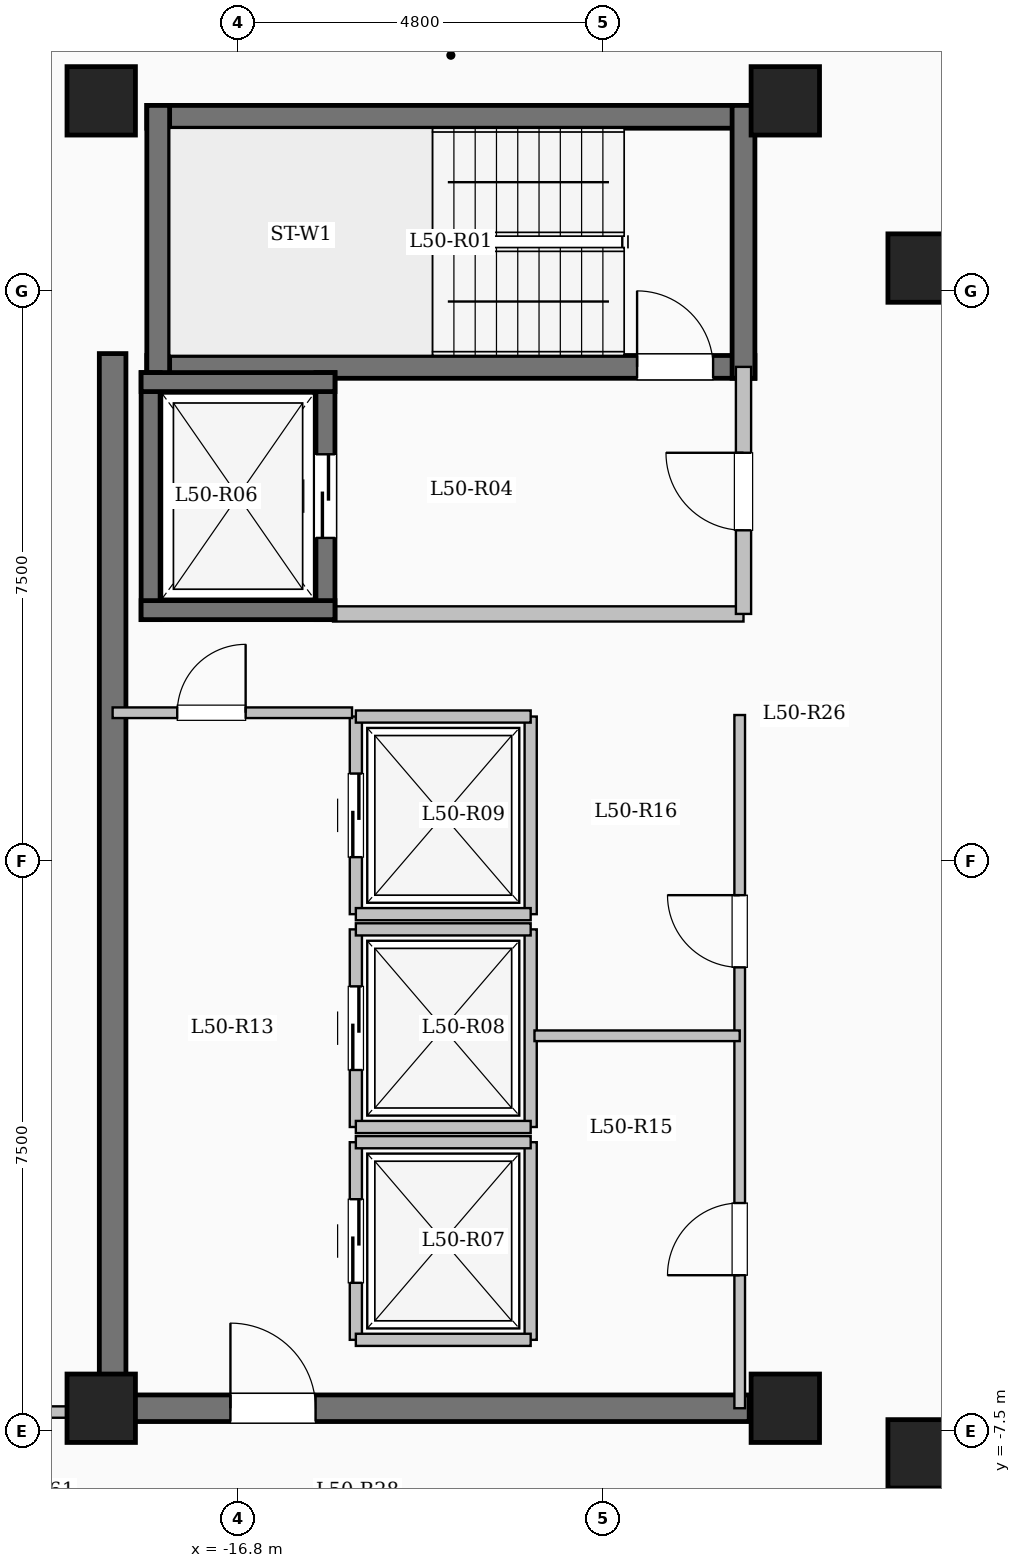
"""IFC4 building model, lengths in metres.
Left out: names, types, materials, properties, quantities, classifications, styles, units other than length and angle.
Written with IfcOpenShell. Run it as: python <this file> out.ifc"""

import sys

from ifc_helpers import new_model, si_unit, direction, frame, frame_2d, origin, origin_2d, place, context, subcontext, project, spatial, rectangle, extrude, element, fill, save


model = new_model("IFC4")
c1 = context("Model", 3, precision=1e-05, world=origin(), true_north=direction((0.0, 1.0)))
c2 = subcontext(c1, "Body", "Model", "MODEL_VIEW")
j1 = project(units=[si_unit("LENGTHUNIT", "METRE"), si_unit("PLANEANGLEUNIT", "RADIAN")], contexts=[c1])
p1 = place(None, origin())
s1 = spatial("IfcSite", under=j1, at=p1, CompositionType="ELEMENT")
p2 = place(p1, origin())
s2 = spatial("IfcBuilding", under=s1, at=p2, CompositionType="ELEMENT")
p3 = place(p2, frame((0.0, 0.0, 186.9)))
s3 = spatial("IfcBuildingStorey", under=s2, at=p3, CompositionType="ELEMENT", Elevation=186.9)
for number, where, z_axis, x_axis in (
    (1, (-7.8, -7.8, 0.0), (0.0, 0.0, 1.0), (1.0, 0.0, 0.0)),
    (2, (-7.8, 7.8, 0.0), (0.0, 0.0, 1.0), (1.0, 0.0, 0.0)),
    (3, (-9.6, -7.2, 0.0), (0.0, 0.0, 1.0), (1.0, 0.0, 0.0)),
    (4, (-9.6, 10.0, 0.0), (0.0, 0.0, 1.0), (1.0, 0.0, 0.0)),
    (5, (-18.6, -7.2, 0.0), (0.0, 0.0, 1.0), (1.0, 0.0, 0.0)),
    (6, (-18.6, 10.0, 0.0), (0.0, 0.0, 1.0), (1.0, 0.0, 0.0)),
):
    element("IfcColumn", number, at=place(p3, frame(where, z_axis=z_axis, x_axis=x_axis)), inside=s3, PredefinedType="COLUMN", context=c2, shape_type="SweptSolid", body=[
        extrude(rectangle(XDim=0.9, YDim=0.9, at=origin_2d()), origin(), (0.0, 0.0, 1.0), 3.35),
    ])
p4 = place(p3, frame((-18.0, 9.79, 0.0), z_axis=(0.0, 0.0, 1.0), x_axis=(1.0, 0.0, 0.0)))
e7 = element("IfcWall", 7, at=p4, inside=s3, PredefinedType="SHEAR", context=c2, shape_type="SweptSolid", body=[
    extrude(rectangle(XDim=8.0, YDim=0.3, at=frame_2d((4.0, 0.0))), origin(), (0.0, 0.0, 1.0), 3.35),
])
p5 = place(p3, frame((-18.0, 6.5, 0.0), z_axis=(0.0, 0.0, 1.0), x_axis=(1.0, 0.0, 0.0)))
e8 = element("IfcWall", 8, at=p5, inside=s3, PredefinedType="SHEAR", context=c2, shape_type="SweptSolid", body=[
    extrude(rectangle(XDim=8.0, YDim=0.3, at=frame_2d((4.0, 0.0))), origin(), (0.0, 0.0, 1.0), 3.35),
])
p6 = place(p5, frame((6.45, 0.0, 0.0)))
e9 = element("IfcOpeningElement", 9, at=p6, cuts=e8, PredefinedType="OPENING", context=c2, shape_type="SweptSolid", body=[
    extrude(rectangle(XDim=1.0, YDim=2.15, at=frame_2d((0.5, 1.075))), frame((0.0, 0.16, 0.0), z_axis=(0.0, -1.0, 0.0), x_axis=(1.0, 0.0, 0.0)), (0.0, 0.0, 1.0), 0.32),
])
for number, where, z_axis, x_axis in (
    (10, (-17.85, 6.35, 0.0), (0.0, 0.0, 1.0), (0.0, 1.0, 0.0)),
    (11, (-10.15, 6.35, 0.0), (0.0, 0.0, 1.0), (0.0, 1.0, 0.0)),
):
    element("IfcWall", number, at=place(p3, frame(where, z_axis=z_axis, x_axis=x_axis)), inside=s3, PredefinedType="SHEAR", context=c2, shape_type="SweptSolid", body=[
        extrude(rectangle(XDim=3.59, YDim=0.3, at=frame_2d((1.795, 0.0))), origin(), (0.0, 0.0, 1.0), 3.35),
    ])
p7 = place(p3, frame((-15.55, 3.25, 0.0), z_axis=(0.0, 0.0, 1.0), x_axis=(1.0, 0.0, 0.0)))
e12 = element("IfcWall", 12, at=p7, inside=s3, PredefinedType="SOLIDWALL", context=c2, shape_type="SweptSolid", body=[
    extrude(rectangle(XDim=5.4, YDim=0.2, at=frame_2d((2.7, 0.0))), origin(), (0.0, 0.0, 1.0), 3.1),
])
p8 = place(p3, frame((-10.15, 3.25, 0.0), z_axis=(0.0, 0.0, 1.0), x_axis=(0.0, 1.0, 0.0)))
e13 = element("IfcWall", 13, at=p8, inside=s3, PredefinedType="SOLIDWALL", context=c2, shape_type="SweptSolid", body=[
    extrude(rectangle(XDim=3.25, YDim=0.2, at=frame_2d((1.625, 0.0))), origin(), (0.0, 0.0, 1.0), 3.1),
])
p9 = place(p8, frame((1.1, 0.0, 0.0)))
e14 = element("IfcOpeningElement", 14, at=p9, cuts=e13, PredefinedType="OPENING", context=c2, shape_type="SweptSolid", body=[
    extrude(rectangle(XDim=1.02, YDim=2.15, at=frame_2d((0.51, 1.075))), frame((0.0, 0.11, 0.0), z_axis=(0.0, -1.0, 0.0), x_axis=(1.0, 0.0, 0.0)), (0.0, 0.0, 1.0), 0.22),
])
p10 = place(p3, frame((-17.95, 3.175, 0.0), z_axis=(0.0, 0.0, 1.0), x_axis=(0.0, 1.0, 0.0)))
e15 = element("IfcWall", 15, at=p10, inside=s3, PredefinedType="SHEAR", context=c2, shape_type="SweptSolid", body=[
    extrude(rectangle(XDim=3.25, YDim=0.25, at=frame_2d((1.625, 0.0))), origin(), (0.0, 0.0, 1.0), 3.35),
])
p11 = place(p3, frame((-15.65, 3.175, 0.0), z_axis=(0.0, 0.0, 1.0), x_axis=(0.0, 1.0, 0.0)))
e16 = element("IfcWall", 16, at=p11, inside=s3, PredefinedType="SHEAR", context=c2, shape_type="SweptSolid", body=[
    extrude(rectangle(XDim=3.25, YDim=0.25, at=frame_2d((1.625, 0.0))), origin(), (0.0, 0.0, 1.0), 3.35),
])
p12 = place(p11, frame((1.075, 0.0, 0.0)))
e17 = element("IfcOpeningElement", 17, at=p12, cuts=e16, PredefinedType="OPENING", context=c2, shape_type="SweptSolid", body=[
    extrude(rectangle(XDim=1.1, YDim=2.15, at=frame_2d((0.55, 1.075))), frame((0.0, 0.135, 0.0), z_axis=(0.0, -1.0, 0.0), x_axis=(1.0, 0.0, 0.0)), (0.0, 0.0, 1.0), 0.27),
])
for number, where, z_axis, x_axis in (
    (18, (-18.075, 3.3, 0.0), (0.0, 0.0, 1.0), (1.0, 0.0, 0.0)),
    (19, (-18.075, 6.3, 0.0), (0.0, 0.0, 1.0), (1.0, 0.0, 0.0)),
):
    element("IfcWall", number, at=place(p3, frame(where, z_axis=z_axis, x_axis=x_axis)), inside=s3, PredefinedType="SHEAR", context=c2, shape_type="SweptSolid", body=[
        extrude(rectangle(XDim=2.55, YDim=0.25, at=frame_2d((1.275, 0.0))), origin(), (0.0, 0.0, 1.0), 3.35),
    ])
p13 = place(p3, frame((-15.25, -6.3, 0.0), z_axis=(0.0, 0.0, 1.0), x_axis=(0.0, 1.0, 0.0)))
e20 = element("IfcWall", 20, at=p13, inside=s3, PredefinedType="SOLIDWALL", context=c2, shape_type="SweptSolid", body=[
    extrude(rectangle(XDim=2.6, YDim=0.16, at=frame_2d((1.3, 0.0))), origin(), (0.0, 0.0, 1.0), 3.1),
])
p14 = place(p13, frame((0.75, 0.0, 0.0)))
e21 = element("IfcOpeningElement", 21, at=p14, cuts=e20, PredefinedType="OPENING", context=c2, shape_type="SweptSolid", body=[
    extrude(rectangle(XDim=1.1, YDim=2.15, at=frame_2d((0.55, 1.075))), frame((0.0, 0.09, 0.0), z_axis=(0.0, -1.0, 0.0), x_axis=(1.0, 0.0, 0.0)), (0.0, 0.0, 1.0), 0.18),
])
p15 = place(p3, frame((-12.95, -6.3, 0.0), z_axis=(0.0, 0.0, 1.0), x_axis=(0.0, 1.0, 0.0)))
e22 = element("IfcWall", 22, at=p15, inside=s3, PredefinedType="SOLIDWALL", context=c2, shape_type="SweptSolid", body=[
    extrude(rectangle(XDim=2.6, YDim=0.16, at=frame_2d((1.3, 0.0))), origin(), (0.0, 0.0, 1.0), 3.1),
])
for number, where, z_axis, x_axis in (
    (23, (-15.25, -6.3, 0.0), (0.0, 0.0, 1.0), (1.0, 0.0, 0.0)),
    (24, (-15.25, -3.7, 0.0), (0.0, 0.0, 1.0), (1.0, 0.0, 0.0)),
):
    element("IfcWall", number, at=place(p3, frame(where, z_axis=z_axis, x_axis=x_axis)), inside=s3, PredefinedType="SOLIDWALL", context=c2, shape_type="SweptSolid", body=[
        extrude(rectangle(XDim=2.3, YDim=0.16, at=frame_2d((1.15, 0.0))), origin(), (0.0, 0.0, 1.0), 3.1),
    ])
p16 = place(p3, frame((-15.25, -3.5, 0.0), z_axis=(0.0, 0.0, 1.0), x_axis=(0.0, 1.0, 0.0)))
e25 = element("IfcWall", 25, at=p16, inside=s3, PredefinedType="SOLIDWALL", context=c2, shape_type="SweptSolid", body=[
    extrude(rectangle(XDim=2.6, YDim=0.16, at=frame_2d((1.3, 0.0))), origin(), (0.0, 0.0, 1.0), 3.1),
])
p17 = place(p16, frame((0.75, 0.0, 0.0)))
e26 = element("IfcOpeningElement", 26, at=p17, cuts=e25, PredefinedType="OPENING", context=c2, shape_type="SweptSolid", body=[
    extrude(rectangle(XDim=1.1, YDim=2.15, at=frame_2d((0.55, 1.075))), frame((0.0, 0.09, 0.0), z_axis=(0.0, -1.0, 0.0), x_axis=(1.0, 0.0, 0.0)), (0.0, 0.0, 1.0), 0.18),
])
p18 = place(p3, frame((-12.95, -3.5, 0.0), z_axis=(0.0, 0.0, 1.0), x_axis=(0.0, 1.0, 0.0)))
e27 = element("IfcWall", 27, at=p18, inside=s3, PredefinedType="SOLIDWALL", context=c2, shape_type="SweptSolid", body=[
    extrude(rectangle(XDim=2.6, YDim=0.16, at=frame_2d((1.3, 0.0))), origin(), (0.0, 0.0, 1.0), 3.1),
])
for number, where, z_axis, x_axis in (
    (28, (-15.25, -3.5, 0.0), (0.0, 0.0, 1.0), (1.0, 0.0, 0.0)),
    (29, (-15.25, -0.9, 0.0), (0.0, 0.0, 1.0), (1.0, 0.0, 0.0)),
):
    element("IfcWall", number, at=place(p3, frame(where, z_axis=z_axis, x_axis=x_axis)), inside=s3, PredefinedType="SOLIDWALL", context=c2, shape_type="SweptSolid", body=[
        extrude(rectangle(XDim=2.3, YDim=0.16, at=frame_2d((1.15, 0.0))), origin(), (0.0, 0.0, 1.0), 3.1),
    ])
p19 = place(p3, frame((-15.25, -0.7, 0.0), z_axis=(0.0, 0.0, 1.0), x_axis=(0.0, 1.0, 0.0)))
e30 = element("IfcWall", 30, at=p19, inside=s3, PredefinedType="SOLIDWALL", context=c2, shape_type="SweptSolid", body=[
    extrude(rectangle(XDim=2.6, YDim=0.16, at=frame_2d((1.3, 0.0))), origin(), (0.0, 0.0, 1.0), 3.1),
])
p20 = place(p19, frame((0.75, 0.0, 0.0)))
e31 = element("IfcOpeningElement", 31, at=p20, cuts=e30, PredefinedType="OPENING", context=c2, shape_type="SweptSolid", body=[
    extrude(rectangle(XDim=1.1, YDim=2.15, at=frame_2d((0.55, 1.075))), frame((0.0, 0.09, 0.0), z_axis=(0.0, -1.0, 0.0), x_axis=(1.0, 0.0, 0.0)), (0.0, 0.0, 1.0), 0.18),
])
p21 = place(p3, frame((-12.95, -0.7, 0.0), z_axis=(0.0, 0.0, 1.0), x_axis=(0.0, 1.0, 0.0)))
e32 = element("IfcWall", 32, at=p21, inside=s3, PredefinedType="SOLIDWALL", context=c2, shape_type="SweptSolid", body=[
    extrude(rectangle(XDim=2.6, YDim=0.16, at=frame_2d((1.3, 0.0))), origin(), (0.0, 0.0, 1.0), 3.1),
])
for number, where, z_axis, x_axis in (
    (33, (-15.25, -0.7, 0.0), (0.0, 0.0, 1.0), (1.0, 0.0, 0.0)),
    (34, (-15.25, 1.9, 0.0), (0.0, 0.0, 1.0), (1.0, 0.0, 0.0)),
):
    element("IfcWall", number, at=place(p3, frame(where, z_axis=z_axis, x_axis=x_axis)), inside=s3, PredefinedType="SOLIDWALL", context=c2, shape_type="SweptSolid", body=[
        extrude(rectangle(XDim=2.3, YDim=0.16, at=frame_2d((1.15, 0.0))), origin(), (0.0, 0.0, 1.0), 3.1),
    ])
p22 = place(p3, frame((-18.45, -7.375, 0.0), z_axis=(0.0, 0.0, 1.0), x_axis=(0.0, 1.0, 0.0)))
e35 = element("IfcWall", 35, at=p22, inside=s3, PredefinedType="SHEAR", context=c2, shape_type="SweptSolid", body=[
    extrude(rectangle(XDim=14.05, YDim=0.35, at=frame_2d((7.025, 0.0))), origin(), (0.0, 0.0, 1.0), 3.35),
])
p23 = place(p3, frame((-18.625, -7.2, 0.0), z_axis=(0.0, 0.0, 1.0), x_axis=(1.0, 0.0, 0.0)))
e36 = element("IfcWall", 36, at=p23, inside=s3, PredefinedType="SHEAR", context=c2, shape_type="SweptSolid", body=[
    extrude(rectangle(XDim=8.55, YDim=0.35, at=frame_2d((4.275, 0.0))), origin(), (0.0, 0.0, 1.0), 3.35),
])
p24 = place(p23, frame((1.725, 0.0, 0.0)))
e37 = element("IfcOpeningElement", 37, at=p24, cuts=e36, PredefinedType="OPENING", context=c2, shape_type="SweptSolid", body=[
    extrude(rectangle(XDim=1.12, YDim=2.15, at=frame_2d((0.56, 1.075))), frame((0.0, 0.185, 0.0), z_axis=(0.0, -1.0, 0.0), x_axis=(1.0, 0.0, 0.0)), (0.0, 0.0, 1.0), 0.37),
])
p25 = place(p3, frame((-18.45, 1.95, 0.0), z_axis=(0.0, 0.0, 1.0), x_axis=(1.0, 0.0, 0.0)))
e38 = element("IfcWall", 38, at=p25, inside=s3, PredefinedType="PARTITIONING", context=c2, shape_type="SweptSolid", body=[
    extrude(rectangle(XDim=3.15, YDim=0.14, at=frame_2d((1.575, 0.0))), origin(), (0.0, 0.0, 1.0), 3.1),
])
p26 = place(p25, frame((0.85, 0.0, 0.0)))
e39 = element("IfcOpeningElement", 39, at=p26, cuts=e38, PredefinedType="OPENING", context=c2, shape_type="SweptSolid", body=[
    extrude(rectangle(XDim=0.9, YDim=2.08, at=frame_2d((0.45, 1.04))), frame((0.0, 0.08, 0.0), z_axis=(0.0, -1.0, 0.0), x_axis=(1.0, 0.0, 0.0)), (0.0, 0.0, 1.0), 0.16),
])
p27 = place(p3, frame((-10.2, -7.2, 0.0), z_axis=(0.0, 0.0, 1.0), x_axis=(0.0, 1.0, 0.0)))
e40 = element("IfcWall", 40, at=p27, inside=s3, PredefinedType="PARTITIONING", context=c2, shape_type="SweptSolid", body=[
    extrude(rectangle(XDim=9.12, YDim=0.14, at=frame_2d((4.56, 0.0))), origin(), (0.0, 0.0, 1.0), 3.1),
])
p28 = place(p27, frame((1.75, 0.0, 0.0)))
e41 = element("IfcOpeningElement", 41, at=p28, cuts=e40, PredefinedType="OPENING", context=c2, shape_type="SweptSolid", body=[
    extrude(rectangle(XDim=0.95, YDim=2.12, at=frame_2d((0.475, 1.06))), frame((0.0, 0.08, 0.0), z_axis=(0.0, -1.0, 0.0), x_axis=(1.0, 0.0, 0.0)), (0.0, 0.0, 1.0), 0.16),
])
p29 = place(p27, frame((5.8, 0.0, 0.0)))
e42 = element("IfcOpeningElement", 42, at=p29, cuts=e40, PredefinedType="OPENING", context=c2, shape_type="SweptSolid", body=[
    extrude(rectangle(XDim=0.95, YDim=2.12, at=frame_2d((0.475, 1.06))), frame((0.0, 0.08, 0.0), z_axis=(0.0, -1.0, 0.0), x_axis=(1.0, 0.0, 0.0)), (0.0, 0.0, 1.0), 0.16),
])
p30 = place(p3, frame((-12.9, -2.3, 0.0), z_axis=(0.0, 0.0, 1.0), x_axis=(1.0, 0.0, 0.0)))
e43 = element("IfcWall", 43, at=p30, inside=s3, PredefinedType="PARTITIONING", context=c2, shape_type="SweptSolid", body=[
    extrude(rectangle(XDim=2.7, YDim=0.14, at=frame_2d((1.35, 0.0))), origin(), (0.0, 0.0, 1.0), 3.1),
])
p31 = place(p3, frame((-23.58, -7.25, 0.0), z_axis=(0.0, 0.0, 1.0), x_axis=(1.0, 0.0, 0.0)))
e44 = element("IfcWall", 44, at=p31, inside=s3, PredefinedType="PARTITIONING", context=c2, shape_type="SweptSolid", body=[
    extrude(rectangle(XDim=5.13, YDim=0.15, at=frame_2d((2.565, 0.0))), origin(), (0.0, 0.0, 1.0), 3.1),
])
p32 = place(p31, frame((2.08, 0.0, 0.0)))
e45 = element("IfcOpeningElement", 45, at=p32, cuts=e44, PredefinedType="OPENING", context=c2, shape_type="SweptSolid", body=[
    extrude(rectangle(XDim=1.08, YDim=2.15, at=frame_2d((0.54, 1.075))), frame((0.0, 0.085, 0.0), z_axis=(0.0, -1.0, 0.0), x_axis=(1.0, 0.0, 0.0)), (0.0, 0.0, 1.0), 0.17),
])
p33 = place(p6, origin())
e46 = element("IfcDoor", 46, at=p33, inside=s3, OperationType="SINGLE_SWING_LEFT", PredefinedType="DOOR", context=c2, shape_type="SweptSolid", body=[
    extrude(rectangle(XDim=1.0, YDim=2.15, at=frame_2d((0.5, 1.075))), frame((0.0, 0.025, 0.0), z_axis=(0.0, -1.0, 0.0), x_axis=(1.0, 0.0, 0.0)), (0.0, 0.0, 1.0), 0.05),
])
fill(e9, e46)
p34 = place(p9, origin())
e47 = element("IfcDoor", 47, at=p34, inside=s3, OperationType="SINGLE_SWING_RIGHT", PredefinedType="DOOR", context=c2, shape_type="SweptSolid", body=[
    extrude(rectangle(XDim=1.02, YDim=2.15, at=frame_2d((0.51, 1.075))), frame((0.0, 0.025, 0.0), z_axis=(0.0, -1.0, 0.0), x_axis=(1.0, 0.0, 0.0)), (0.0, 0.0, 1.0), 0.05),
])
fill(e14, e47)
p35 = place(p12, origin())
e48 = element("IfcDoor", 48, at=p35, inside=s3, OperationType="SLIDING_TO_LEFT", PredefinedType="DOOR", context=c2, shape_type="SweptSolid", body=[
    extrude(rectangle(XDim=1.1, YDim=2.15, at=frame_2d((0.55, 1.075))), frame((0.0, 0.025, 0.0), z_axis=(0.0, -1.0, 0.0), x_axis=(1.0, 0.0, 0.0)), (0.0, 0.0, 1.0), 0.05),
])
fill(e17, e48)
p36 = place(p14, origin())
e49 = element("IfcDoor", 49, at=p36, inside=s3, OperationType="SLIDING_TO_LEFT", PredefinedType="DOOR", context=c2, shape_type="SweptSolid", body=[
    extrude(rectangle(XDim=1.1, YDim=2.15, at=frame_2d((0.55, 1.075))), frame((0.0, 0.025, 0.0), z_axis=(0.0, -1.0, 0.0), x_axis=(1.0, 0.0, 0.0)), (0.0, 0.0, 1.0), 0.05),
])
fill(e21, e49)
p37 = place(p17, origin())
e50 = element("IfcDoor", 50, at=p37, inside=s3, OperationType="SLIDING_TO_LEFT", PredefinedType="DOOR", context=c2, shape_type="SweptSolid", body=[
    extrude(rectangle(XDim=1.1, YDim=2.15, at=frame_2d((0.55, 1.075))), frame((0.0, 0.025, 0.0), z_axis=(0.0, -1.0, 0.0), x_axis=(1.0, 0.0, 0.0)), (0.0, 0.0, 1.0), 0.05),
])
fill(e26, e50)
p38 = place(p20, origin())
e51 = element("IfcDoor", 51, at=p38, inside=s3, OperationType="SLIDING_TO_LEFT", PredefinedType="DOOR", context=c2, shape_type="SweptSolid", body=[
    extrude(rectangle(XDim=1.1, YDim=2.15, at=frame_2d((0.55, 1.075))), frame((0.0, 0.025, 0.0), z_axis=(0.0, -1.0, 0.0), x_axis=(1.0, 0.0, 0.0)), (0.0, 0.0, 1.0), 0.05),
])
fill(e31, e51)
p39 = place(p24, origin())
e52 = element("IfcDoor", 52, at=p39, inside=s3, OperationType="SINGLE_SWING_LEFT", PredefinedType="DOOR", context=c2, shape_type="SweptSolid", body=[
    extrude(rectangle(XDim=1.12, YDim=2.15, at=frame_2d((0.56, 1.075))), frame((0.0, 0.025, 0.0), z_axis=(0.0, -1.0, 0.0), x_axis=(1.0, 0.0, 0.0)), (0.0, 0.0, 1.0), 0.05),
])
fill(e37, e52)
p40 = place(p26, origin())
e53 = element("IfcDoor", 53, at=p40, inside=s3, OperationType="SINGLE_SWING_RIGHT", PredefinedType="DOOR", context=c2, shape_type="SweptSolid", body=[
    extrude(rectangle(XDim=0.9, YDim=2.08, at=frame_2d((0.45, 1.04))), frame((0.0, 0.025, 0.0), z_axis=(0.0, -1.0, 0.0), x_axis=(1.0, 0.0, 0.0)), (0.0, 0.0, 1.0), 0.05),
])
fill(e39, e53)
p41 = place(p28, origin())
e54 = element("IfcDoor", 54, at=p41, inside=s3, OperationType="SINGLE_SWING_LEFT", PredefinedType="DOOR", context=c2, shape_type="SweptSolid", body=[
    extrude(rectangle(XDim=0.95, YDim=2.12, at=frame_2d((0.475, 1.06))), frame((0.0, 0.025, 0.0), z_axis=(0.0, -1.0, 0.0), x_axis=(1.0, 0.0, 0.0)), (0.0, 0.0, 1.0), 0.05),
])
fill(e41, e54)
p42 = place(p29, origin())
e55 = element("IfcDoor", 55, at=p42, inside=s3, OperationType="SINGLE_SWING_RIGHT", PredefinedType="DOOR", context=c2, shape_type="SweptSolid", body=[
    extrude(rectangle(XDim=0.95, YDim=2.12, at=frame_2d((0.475, 1.06))), frame((0.0, 0.025, 0.0), z_axis=(0.0, -1.0, 0.0), x_axis=(1.0, 0.0, 0.0)), (0.0, 0.0, 1.0), 0.05),
])
fill(e42, e55)
save(model, sys.argv[1])
